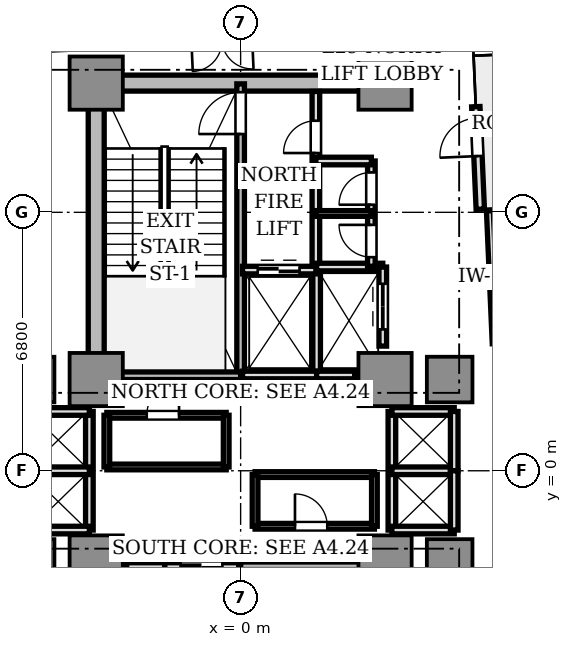
"""IFC4 building model, lengths in metres.
Left out: names, types, materials, properties, quantities, classifications, styles, units other than length and angle.
Written with IfcOpenShell. Run it as: python <this file> out.ifc"""

import sys

from ifc_helpers import new_model, si_unit, direction, frame, frame_2d, origin, origin_2d, place, context, subcontext, project, spatial, rectangle, extrude, source, transform, mapped, element, fill, save


model = new_model("IFC4")
c1 = context("Model", 3, precision=1e-05, world=origin(), true_north=direction((0.0, 1.0)))
c2 = subcontext(c1, "Body", "Model", "MODEL_VIEW")
j1 = project(units=[si_unit("LENGTHUNIT", "METRE"), si_unit("PLANEANGLEUNIT", "RADIAN")], contexts=[c1])
p1 = place(None, origin())
s1 = spatial("IfcSite", under=j1, at=p1, CompositionType="ELEMENT")
p2 = place(p1, origin())
s2 = spatial("IfcBuilding", under=s1, at=p2, CompositionType="ELEMENT")
p3 = place(p2, frame((0.0, 0.0, 106.95)))
s3 = spatial("IfcBuildingStorey", under=s2, at=p3, CompositionType="ELEMENT", Elevation=106.95)
p4 = place(p3, frame((-3.55, 10.2, 0.0), z_axis=(0.0, 0.0, 1.0), x_axis=(1.0, 0.0, 0.0)))
e1 = element("IfcWall", 1, at=p4, inside=s3, PredefinedType="SHEAR", context=c2, shape_type="SweptSolid", body=[
    extrude(rectangle(XDim=7.1, YDim=0.42, at=frame_2d((3.55, 0.0))), origin(), (0.0, 0.0, 1.0), 4.26),
])
p5 = place(p3, frame((-3.8, 2.85, 0.0), z_axis=(0.0, 0.0, 1.0), x_axis=(0.0, 1.0, 0.0)))
e2 = element("IfcWall", 2, at=p5, inside=s3, PredefinedType="SHEAR", context=c2, shape_type="SweptSolid", body=[
    extrude(rectangle(XDim=6.9, YDim=0.42, at=frame_2d((3.45, 0.0))), origin(), (0.0, 0.0, 1.0), 4.26),
])
m1 = source(origin(), c2, "Body", "SweptSolid", [
    extrude(rectangle(XDim=1.4, YDim=1.4, at=origin_2d()), origin(), (0.0, 0.0, 1.0), 4.26),
])
for number, where, z_axis, x_axis in (
    (3, (-3.8, 2.4, 0.0), (0.0, 0.0, 1.0), (1.0, 0.0, 0.0)),
    (4, (3.8, 2.4, 0.0), (0.0, 0.0, 1.0), (1.0, 0.0, 0.0)),
    (5, (-3.8, 10.2, 0.0), (0.0, 0.0, 1.0), (1.0, 0.0, 0.0)),
    (6, (3.8, 10.2, 0.0), (0.0, 0.0, 1.0), (1.0, 0.0, 0.0)),
    (7, (-3.8, -2.4, 0.0), (0.0, 0.0, 1.0), (1.0, 0.0, 0.0)),
    (8, (3.8, -2.4, 0.0), (0.0, 0.0, 1.0), (1.0, 0.0, 0.0)),
):
    element("IfcColumn", number, at=place(p3, frame(where, z_axis=z_axis, x_axis=x_axis)), inside=s3, PredefinedType="COLUMN", context=c2, shape_type="MappedRepresentation", body=[
        mapped(m1, transform((0.0, 0.0, 0.0), scale=1.0)),
    ])
m2 = source(origin(), c2, "Body", "SweptSolid", [
    extrude(rectangle(XDim=1.2, YDim=1.2, at=origin_2d()), origin(), (0.0, 0.0, 1.0), 4.26),
])
for number, where, z_axis, x_axis in (
    (9, (5.5, 2.4, 0.0), (0.0, 0.0, 1.0), (1.0, 0.0, 0.0)),
    (10, (-5.5, 2.4, 0.0), (0.0, 0.0, 1.0), (1.0, 0.0, 0.0)),
    (11, (5.5, -2.4, 0.0), (0.0, 0.0, 1.0), (1.0, 0.0, 0.0)),
    (12, (-5.5, -2.4, 0.0), (0.0, 0.0, 1.0), (1.0, 0.0, 0.0)),
):
    element("IfcColumn", number, at=place(p3, frame(where, z_axis=z_axis, x_axis=x_axis)), inside=s3, PredefinedType="COLUMN", context=c2, shape_type="MappedRepresentation", body=[
        mapped(m2, transform((0.0, 0.0, 0.0), scale=1.0)),
    ])
p6 = place(p3, frame((6.306, 6.882, 0.0), z_axis=(0.0, 0.0, 1.0), x_axis=(-0.043672655174, 0.999045894436, 0.0)))
e13 = element("IfcWall", 13, at=p6, inside=s3, PredefinedType="STANDARD", context=c2, shape_type="SweptSolid", body=[
    extrude(rectangle(XDim=2.7, YDim=0.22, at=frame_2d((1.35, 0.0))), origin(), (0.0, 0.0, 1.0), 4.26),
])
p7 = place(p6, frame((1.4, 0.0, 0.0)))
e14 = element("IfcOpeningElement", 14, at=p7, cuts=e13, PredefinedType="OPENING", context=c2, shape_type="SweptSolid", body=[
    extrude(rectangle(XDim=1.0, YDim=2.2, at=frame_2d((0.5, 1.1))), frame((0.0, 0.12, 0.0), z_axis=(0.0, -1.0, 0.0), x_axis=(1.0, 0.0, 0.0)), (0.0, 0.0, 1.0), 0.24),
])
p8 = place(p3, frame((0.0, 2.5, 0.0), z_axis=(0.0, 0.0, 1.0), x_axis=(0.0, 1.0, 0.0)))
e15 = element("IfcWall", 15, at=p8, inside=s3, PredefinedType="SOLIDWALL", context=c2, shape_type="SweptSolid", body=[
    extrude(rectangle(XDim=7.68, YDim=0.2, at=frame_2d((3.84, 0.0))), origin(), (0.0, 0.0, 1.0), 4.26),
])
p9 = place(p8, frame((6.36, 0.0, 0.0)))
e16 = element("IfcOpeningElement", 16, at=p9, cuts=e15, PredefinedType="OPENING", context=c2, shape_type="SweptSolid", body=[
    extrude(rectangle(XDim=1.1, YDim=2.15, at=frame_2d((0.55, 1.075))), frame((0.0, 0.11, 0.0), z_axis=(0.0, -1.0, 0.0), x_axis=(1.0, 0.0, 0.0)), (0.0, 0.0, 1.0), 0.22),
])
p10 = place(p3, frame((-3.72, 2.5, 0.0), z_axis=(0.0, 0.0, 1.0), x_axis=(1.0, 0.0, 0.0)))
e17 = element("IfcWall", 17, at=p10, inside=s3, PredefinedType="SOLIDWALL", context=c2, shape_type="SweptSolid", body=[
    extrude(rectangle(XDim=3.72, YDim=0.2, at=frame_2d((1.86, 0.0))), origin(), (0.0, 0.0, 1.0), 4.26),
])
p11 = place(p3, frame((0.0, -10.18, 0.0), z_axis=(0.0, 0.0, 1.0), x_axis=(0.0, 1.0, 0.0)))
e18 = element("IfcWall", 18, at=p11, inside=s3, PredefinedType="SOLIDWALL", context=c2, shape_type="SweptSolid", body=[
    extrude(rectangle(XDim=7.68, YDim=0.2, at=frame_2d((3.84, 0.0))), origin(), (0.0, 0.0, 1.0), 4.26),
])
p12 = place(p11, frame((0.28, 0.0, 0.0)))
e19 = element("IfcOpeningElement", 19, at=p12, cuts=e18, PredefinedType="OPENING", context=c2, shape_type="SweptSolid", body=[
    extrude(rectangle(XDim=1.1, YDim=2.15, at=frame_2d((0.55, 1.075))), frame((0.0, 0.11, 0.0), z_axis=(0.0, -1.0, 0.0), x_axis=(1.0, 0.0, 0.0)), (0.0, 0.0, 1.0), 0.22),
])
p13 = place(p3, frame((0.0, -2.5, 0.0), z_axis=(0.0, 0.0, 1.0), x_axis=(1.0, 0.0, 0.0)))
e20 = element("IfcWall", 20, at=p13, inside=s3, PredefinedType="SOLIDWALL", context=c2, shape_type="SweptSolid", body=[
    extrude(rectangle(XDim=3.72, YDim=0.2, at=frame_2d((1.86, 0.0))), origin(), (0.0, 0.0, 1.0), 4.26),
])
p14 = place(p3, frame((1.98, 5.32, 0.0), z_axis=(0.0, 0.0, 1.0), x_axis=(0.0, 1.0, 0.0)))
e21 = element("IfcWall", 21, at=p14, inside=s3, PredefinedType="SOLIDWALL", context=c2, shape_type="SweptSolid", body=[
    extrude(rectangle(XDim=4.66, YDim=0.2, at=frame_2d((2.33, 0.0))), origin(), (0.0, 0.0, 1.0), 3.81),
])
p15 = place(p14, frame((3.04, 0.0, 0.0)))
e22 = element("IfcOpeningElement", 22, at=p15, cuts=e21, PredefinedType="OPENING", context=c2, shape_type="SweptSolid", body=[
    extrude(rectangle(XDim=0.85, YDim=2.1, at=frame_2d((0.425, 1.05))), frame((0.0, 0.11, 0.0), z_axis=(0.0, -1.0, 0.0), x_axis=(1.0, 0.0, 0.0)), (0.0, 0.0, 1.0), 0.22),
])
p16 = place(p3, frame((2.0, 2.5, 0.0), z_axis=(0.0, 0.0, 1.0), x_axis=(0.0, 1.0, 0.0)))
e23 = element("IfcWall", 23, at=p16, inside=s3, PredefinedType="SOLIDWALL", context=c2, shape_type="SweptSolid", body=[
    extrude(rectangle(XDim=2.78, YDim=0.2, at=frame_2d((1.39, 0.0))), origin(), (0.0, 0.0, 1.0), 3.81),
])
p17 = place(p3, frame((0.05, 2.52, 0.0), z_axis=(0.0, 0.0, 1.0), x_axis=(1.0, 0.0, 0.0)))
e24 = element("IfcWall", 24, at=p17, inside=s3, PredefinedType="SOLIDWALL", context=c2, shape_type="SweptSolid", body=[
    extrude(rectangle(XDim=1.95, YDim=0.2, at=frame_2d((0.975, 0.0))), origin(), (0.0, 0.0, 1.0), 3.81),
])
p18 = place(p3, frame((0.05, 5.28, 0.0), z_axis=(0.0, 0.0, 1.0), x_axis=(1.0, 0.0, 0.0)))
e25 = element("IfcWall", 25, at=p18, inside=s3, PredefinedType="SOLIDWALL", context=c2, shape_type="SweptSolid", body=[
    extrude(rectangle(XDim=1.93, YDim=0.2, at=frame_2d((0.965, 0.0))), origin(), (0.0, 0.0, 1.0), 3.81),
])
p19 = place(p18, frame((0.4, 0.0, 0.0)))
e26 = element("IfcOpeningElement", 26, at=p19, cuts=e25, PredefinedType="OPENING", context=c2, shape_type="SweptSolid", body=[
    extrude(rectangle(XDim=1.1, YDim=2.2, at=frame_2d((0.55, 1.1))), frame((0.0, 0.11, 0.0), z_axis=(0.0, -1.0, 0.0), x_axis=(1.0, 0.0, 0.0)), (0.0, 0.0, 1.0), 0.22),
])
p20 = place(p3, frame((-2.0, -5.28, 0.0), z_axis=(0.0, 0.0, 1.0), x_axis=(0.0, 1.0, 0.0)))
e27 = element("IfcWall", 27, at=p20, inside=s3, PredefinedType="SOLIDWALL", context=c2, shape_type="SweptSolid", body=[
    extrude(rectangle(XDim=2.78, YDim=0.2, at=frame_2d((1.39, 0.0))), origin(), (0.0, 0.0, 1.0), 3.81),
])
p21 = place(p3, frame((-2.0, -2.52, 0.0), z_axis=(0.0, 0.0, 1.0), x_axis=(1.0, 0.0, 0.0)))
e28 = element("IfcWall", 28, at=p21, inside=s3, PredefinedType="SOLIDWALL", context=c2, shape_type="SweptSolid", body=[
    extrude(rectangle(XDim=1.95, YDim=0.2, at=frame_2d((0.975, 0.0))), origin(), (0.0, 0.0, 1.0), 3.81),
])
p22 = place(p21, frame((0.42, 0.0, 0.0)))
e29 = element("IfcOpeningElement", 29, at=p22, cuts=e28, PredefinedType="OPENING", context=c2, shape_type="SweptSolid", body=[
    extrude(rectangle(XDim=1.1, YDim=2.2, at=frame_2d((0.55, 1.1))), frame((0.0, 0.11, 0.0), z_axis=(0.0, -1.0, 0.0), x_axis=(1.0, 0.0, 0.0)), (0.0, 0.0, 1.0), 0.22),
])
p23 = place(p3, frame((2.0, 2.52, 0.0), z_axis=(0.0, 0.0, 1.0), x_axis=(1.0, 0.0, 0.0)))
e30 = element("IfcWall", 30, at=p23, inside=s3, PredefinedType="SOLIDWALL", context=c2, shape_type="SweptSolid", body=[
    extrude(rectangle(XDim=1.0, YDim=0.2, at=frame_2d((0.5, 0.0))), origin(), (0.0, 0.0, 1.0), 3.81),
])
p24 = place(p3, frame((2.0, 5.36, 0.0), z_axis=(0.0, 0.0, 1.0), x_axis=(1.0, 0.0, 0.0)))
e31 = element("IfcWall", 31, at=p24, inside=s3, PredefinedType="SOLIDWALL", context=c2, shape_type="SweptSolid", body=[
    extrude(rectangle(XDim=1.74, YDim=0.2, at=frame_2d((0.87, 0.0))), origin(), (0.0, 0.0, 1.0), 3.81),
])
p25 = place(p3, frame((3.74, 3.28, 0.0), z_axis=(0.0, 0.0, 1.0), x_axis=(0.0, 1.0, 0.0)))
e32 = element("IfcWall", 32, at=p25, inside=s3, PredefinedType="SOLIDWALL", context=c2, shape_type="SweptSolid", body=[
    extrude(rectangle(XDim=2.08, YDim=0.2, at=frame_2d((1.04, 0.0))), origin(), (0.0, 0.0, 1.0), 3.81),
])
p26 = place(p25, frame((0.44, 0.0, 0.0)))
e33 = element("IfcOpeningElement", 33, at=p26, cuts=e32, PredefinedType="OPENING", context=c2, shape_type="SweptSolid", body=[
    extrude(rectangle(XDim=1.2, YDim=2.2, at=frame_2d((0.6, 1.1))), frame((0.0, 0.11, 0.0), z_axis=(0.0, -1.0, 0.0), x_axis=(1.0, 0.0, 0.0)), (0.0, 0.0, 1.0), 0.22),
])
p27 = place(p3, frame((-3.0, -2.52, 0.0), z_axis=(0.0, 0.0, 1.0), x_axis=(1.0, 0.0, 0.0)))
e34 = element("IfcWall", 34, at=p27, inside=s3, PredefinedType="SOLIDWALL", context=c2, shape_type="SweptSolid", body=[
    extrude(rectangle(XDim=1.0, YDim=0.2, at=frame_2d((0.5, 0.0))), origin(), (0.0, 0.0, 1.0), 3.81),
])
p28 = place(p3, frame((3.98, -1.56, 0.0), z_axis=(0.0, 0.0, 1.0), x_axis=(0.0, 1.0, 0.0)))
e35 = element("IfcWall", 35, at=p28, inside=s3, PredefinedType="SOLIDWALL", context=c2, shape_type="SweptSolid", body=[
    extrude(rectangle(XDim=3.12, YDim=0.2, at=frame_2d((1.56, 0.0))), origin(), (0.0, 0.0, 1.0), 3.43),
])
for number, where, z_axis, x_axis in (
    (36, (3.98, 1.56, 0.0), (0.0, 0.0, 1.0), (1.0, 0.0, 0.0)),
    (37, (3.98, -1.56, 0.0), (0.0, 0.0, 1.0), (1.0, 0.0, 0.0)),
    (38, (3.98, 0.0, 0.0), (0.0, 0.0, 1.0), (1.0, 0.0, 0.0)),
):
    element("IfcWall", number, at=place(p3, frame(where, z_axis=z_axis, x_axis=x_axis)), inside=s3, PredefinedType="SOLIDWALL", context=c2, shape_type="SweptSolid", body=[
        extrude(rectangle(XDim=1.64, YDim=0.2, at=frame_2d((0.82, 0.0))), origin(), (0.0, 0.0, 1.0), 3.81),
    ])
for number, where, z_axis, x_axis in (
    (39, (5.62, 0.0, 0.0), (0.0, 0.0, 1.0), (0.0, 1.0, 0.0)),
    (40, (5.62, -1.56, 0.0), (0.0, 0.0, 1.0), (0.0, 1.0, 0.0)),
):
    element("IfcWall", number, at=place(p3, frame(where, z_axis=z_axis, x_axis=x_axis)), inside=s3, PredefinedType="SOLIDWALL", context=c2, shape_type="SweptSolid", body=[
        extrude(rectangle(XDim=1.56, YDim=0.2, at=frame_2d((0.78, 0.0))), origin(), (0.0, 0.0, 1.0), 3.81),
    ])
p29 = place(p3, frame((-3.98, -1.56, 0.0), z_axis=(0.0, 0.0, 1.0), x_axis=(0.0, 1.0, 0.0)))
e41 = element("IfcWall", 41, at=p29, inside=s3, PredefinedType="SOLIDWALL", context=c2, shape_type="SweptSolid", body=[
    extrude(rectangle(XDim=3.12, YDim=0.2, at=frame_2d((1.56, 0.0))), origin(), (0.0, 0.0, 1.0), 3.43),
])
for number, where, z_axis, x_axis in (
    (42, (-5.62, 1.56, 0.0), (0.0, 0.0, 1.0), (1.0, 0.0, 0.0)),
    (43, (-5.62, -1.56, 0.0), (0.0, 0.0, 1.0), (1.0, 0.0, 0.0)),
    (44, (-5.62, 0.0, 0.0), (0.0, 0.0, 1.0), (1.0, 0.0, 0.0)),
):
    element("IfcWall", number, at=place(p3, frame(where, z_axis=z_axis, x_axis=x_axis)), inside=s3, PredefinedType="SOLIDWALL", context=c2, shape_type="SweptSolid", body=[
        extrude(rectangle(XDim=1.64, YDim=0.2, at=frame_2d((0.82, 0.0))), origin(), (0.0, 0.0, 1.0), 3.81),
    ])
p30 = place(p3, frame((3.44, 5.38, 0.0), z_axis=(0.0, 0.0, 1.0), x_axis=(0.0, 1.0, 0.0)))
e45 = element("IfcWall", 45, at=p30, inside=s3, PredefinedType="SOLIDWALL", context=c2, shape_type="SweptSolid", body=[
    extrude(rectangle(XDim=2.77, YDim=0.2, at=frame_2d((1.385, 0.0))), origin(), (0.0, 0.0, 1.0), 3.81),
])
p31 = place(p30, frame((0.24, 0.0, 0.0)))
e46 = element("IfcOpeningElement", 46, at=p31, cuts=e45, PredefinedType="OPENING", context=c2, shape_type="SweptSolid", body=[
    extrude(rectangle(XDim=0.85, YDim=2.1, at=frame_2d((0.425, 1.05))), frame((0.0, 0.11, 0.0), z_axis=(0.0, -1.0, 0.0), x_axis=(1.0, 0.0, 0.0)), (0.0, 0.0, 1.0), 0.22),
])
p32 = place(p30, frame((1.62, 0.0, 0.0)))
e47 = element("IfcOpeningElement", 47, at=p32, cuts=e45, PredefinedType="OPENING", context=c2, shape_type="SweptSolid", body=[
    extrude(rectangle(XDim=0.85, YDim=2.1, at=frame_2d((0.425, 1.05))), frame((0.0, 0.11, 0.0), z_axis=(0.0, -1.0, 0.0), x_axis=(1.0, 0.0, 0.0)), (0.0, 0.0, 1.0), 0.22),
])
p33 = place(p3, frame((1.98, 8.15, 0.0), z_axis=(0.0, 0.0, 1.0), x_axis=(1.0, 0.0, 0.0)))
e48 = element("IfcWall", 48, at=p33, inside=s3, PredefinedType="SOLIDWALL", context=c2, shape_type="SweptSolid", body=[
    extrude(rectangle(XDim=1.46, YDim=0.2, at=frame_2d((0.73, 0.0))), origin(), (0.0, 0.0, 1.0), 3.81),
])
p34 = place(p3, frame((1.98, 6.77, 0.0), z_axis=(0.0, 0.0, 1.0), x_axis=(1.0, 0.0, 0.0)))
e49 = element("IfcWall", 49, at=p34, inside=s3, PredefinedType="PARTITIONING", context=c2, shape_type="SweptSolid", body=[
    extrude(rectangle(XDim=1.46, YDim=0.15, at=frame_2d((0.73, 0.0))), origin(), (0.0, 0.0, 1.0), 3.81),
])
p35 = place(p3, frame((-3.52, 0.1, 0.0), z_axis=(0.0, 0.0, 1.0), x_axis=(1.0, 0.0, 0.0)))
e50 = element("IfcWall", 50, at=p35, inside=s3, PredefinedType="PARTITIONING", context=c2, shape_type="SweptSolid", body=[
    extrude(rectangle(XDim=3.14, YDim=0.15, at=frame_2d((1.57, 0.0))), origin(), (0.0, 0.0, 1.0), 3.81),
])
p36 = place(p3, frame((-3.52, 1.46, 0.0), z_axis=(0.0, 0.0, 1.0), x_axis=(1.0, 0.0, 0.0)))
e51 = element("IfcWall", 51, at=p36, inside=s3, PredefinedType="PARTITIONING", context=c2, shape_type="SweptSolid", body=[
    extrude(rectangle(XDim=3.14, YDim=0.15, at=frame_2d((1.57, 0.0))), origin(), (0.0, 0.0, 1.0), 3.81),
])
p37 = place(p36, frame((1.05, 0.0, 0.0)))
e52 = element("IfcOpeningElement", 52, at=p37, cuts=e51, PredefinedType="OPENING", context=c2, shape_type="SweptSolid", body=[
    extrude(rectangle(XDim=0.85, YDim=2.1, at=frame_2d((0.425, 1.05))), frame((0.0, 0.085, 0.0), z_axis=(0.0, -1.0, 0.0), x_axis=(1.0, 0.0, 0.0)), (0.0, 0.0, 1.0), 0.17),
])
p38 = place(p3, frame((-3.52, 0.1, 0.0), z_axis=(0.0, 0.0, 1.0), x_axis=(0.0, 1.0, 0.0)))
e53 = element("IfcWall", 53, at=p38, inside=s3, PredefinedType="PARTITIONING", context=c2, shape_type="SweptSolid", body=[
    extrude(rectangle(XDim=1.36, YDim=0.15, at=frame_2d((0.68, 0.0))), origin(), (0.0, 0.0, 1.0), 3.43),
])
p39 = place(p3, frame((-0.38, 0.1, 0.0), z_axis=(0.0, 0.0, 1.0), x_axis=(0.0, 1.0, 0.0)))
e54 = element("IfcWall", 54, at=p39, inside=s3, PredefinedType="PARTITIONING", context=c2, shape_type="SweptSolid", body=[
    extrude(rectangle(XDim=1.36, YDim=0.15, at=frame_2d((0.68, 0.0))), origin(), (0.0, 0.0, 1.0), 3.81),
])
p40 = place(p3, frame((0.38, -0.1, 0.0), z_axis=(0.0, 0.0, 1.0), x_axis=(1.0, 0.0, 0.0)))
e55 = element("IfcWall", 55, at=p40, inside=s3, PredefinedType="PARTITIONING", context=c2, shape_type="SweptSolid", body=[
    extrude(rectangle(XDim=3.14, YDim=0.15, at=frame_2d((1.57, 0.0))), origin(), (0.0, 0.0, 1.0), 3.81),
])
p41 = place(p3, frame((0.38, -1.46, 0.0), z_axis=(0.0, 0.0, 1.0), x_axis=(1.0, 0.0, 0.0)))
e56 = element("IfcWall", 56, at=p41, inside=s3, PredefinedType="PARTITIONING", context=c2, shape_type="SweptSolid", body=[
    extrude(rectangle(XDim=3.14, YDim=0.15, at=frame_2d((1.57, 0.0))), origin(), (0.0, 0.0, 1.0), 3.81),
])
p42 = place(p41, frame((1.05, 0.0, 0.0)))
e57 = element("IfcOpeningElement", 57, at=p42, cuts=e56, PredefinedType="OPENING", context=c2, shape_type="SweptSolid", body=[
    extrude(rectangle(XDim=0.85, YDim=2.1, at=frame_2d((0.425, 1.05))), frame((0.0, 0.085, 0.0), z_axis=(0.0, -1.0, 0.0), x_axis=(1.0, 0.0, 0.0)), (0.0, 0.0, 1.0), 0.17),
])
p43 = place(p3, frame((0.38, -1.46, 0.0), z_axis=(0.0, 0.0, 1.0), x_axis=(0.0, 1.0, 0.0)))
e58 = element("IfcWall", 58, at=p43, inside=s3, PredefinedType="PARTITIONING", context=c2, shape_type="SweptSolid", body=[
    extrude(rectangle(XDim=1.36, YDim=0.15, at=frame_2d((0.68, 0.0))), origin(), (0.0, 0.0, 1.0), 3.81),
])
p44 = place(p3, frame((3.52, -1.46, 0.0), z_axis=(0.0, 0.0, 1.0), x_axis=(0.0, 1.0, 0.0)))
e59 = element("IfcWall", 59, at=p44, inside=s3, PredefinedType="PARTITIONING", context=c2, shape_type="SweptSolid", body=[
    extrude(rectangle(XDim=1.36, YDim=0.15, at=frame_2d((0.68, 0.0))), origin(), (0.0, 0.0, 1.0), 3.43),
])
p45 = place(p3, frame((6.71, 3.346, 0.0), z_axis=(0.0, 0.0, 1.0), x_axis=(-0.043597663116, 0.999049169846, 0.0)))
e60 = element("IfcWall", 60, at=p45, inside=s3, PredefinedType="PARTITIONING", context=c2, shape_type="SweptSolid", body=[
    extrude(rectangle(XDim=3.5, YDim=0.18, at=frame_2d((1.75, 0.0))), origin(), (0.0, 0.0, 1.0), 3.81),
])
p46 = place(p3, frame((6.049, 11.625, 0.0), z_axis=(0.0, 0.0, 1.0), x_axis=(-0.999047806124, -0.043628901879, 0.0)))
e61 = element("IfcWall", 61, at=p46, inside=s3, PredefinedType="PARTITIONING", context=c2, shape_type="SweptSolid", body=[
    extrude(rectangle(XDim=13.1, YDim=0.15, at=frame_2d((6.55, 0.0))), origin(), (0.0, 0.0, 1.0), 3.81),
])
p47 = place(p46, frame((5.75, 0.0, 0.0)))
e62 = element("IfcOpeningElement", 62, at=p47, cuts=e61, PredefinedType="OPENING", context=c2, shape_type="SweptSolid", body=[
    extrude(rectangle(XDim=1.6, YDim=2.25, at=frame_2d((0.8, 1.125))), frame((0.0, 0.085, 0.0), z_axis=(0.0, -1.0, 0.0), x_axis=(1.0, 0.0, 0.0)), (0.0, 0.0, 1.0), 0.17),
])
m3 = source(origin(), c2, "Body", "SweptSolid", [
    extrude(rectangle(XDim=1.0, YDim=0.05, at=origin_2d()), origin(), (0.0, 0.0, 1.0), 2.2),
])
p48 = place(p7, frame((0.5, 0.0, 0.0)))
e63 = element("IfcDoor", 63, at=p48, inside=s3, OperationType="SINGLE_SWING_LEFT", PredefinedType="DOOR", context=c2, shape_type="MappedRepresentation", body=[
    mapped(m3, transform((0.0, 0.0, 0.0), scale=1.0)),
])
fill(e14, e63)
m4 = source(origin(), c2, "Body", "SweptSolid", [
    extrude(rectangle(XDim=1.1, YDim=0.05, at=origin_2d()), origin(), (0.0, 0.0, 1.0), 2.15),
])
p49 = place(p9, frame((0.55, 0.0, 0.0)))
e64 = element("IfcDoor", 64, at=p49, inside=s3, OperationType="SINGLE_SWING_LEFT", PredefinedType="DOOR", context=c2, shape_type="MappedRepresentation", body=[
    mapped(m4, transform((0.0, 0.0, 0.0), scale=1.0)),
])
fill(e16, e64)
m5 = source(origin(), c2, "Body", "SweptSolid", [
    extrude(rectangle(XDim=0.85, YDim=0.05, at=origin_2d()), origin(), (0.0, 0.0, 1.0), 2.1),
])
p50 = place(p15, frame((0.425, 0.0, 0.0)))
e65 = element("IfcDoor", 65, at=p50, inside=s3, OperationType="SINGLE_SWING_LEFT", PredefinedType="DOOR", context=c2, shape_type="MappedRepresentation", body=[
    mapped(m5, transform((0.0, 0.0, 0.0), scale=1.0)),
])
fill(e22, e65)
m6 = source(origin(), c2, "Body", "SweptSolid", [
    extrude(rectangle(XDim=1.1, YDim=0.05, at=origin_2d()), origin(), (0.0, 0.0, 1.0), 2.2),
])
p51 = place(p19, frame((0.55, 0.0, 0.0)))
e66 = element("IfcDoor", 66, at=p51, inside=s3, OperationType="DOUBLE_DOOR_SLIDING", PredefinedType="DOOR", context=c2, shape_type="MappedRepresentation", body=[
    mapped(m6, transform((0.0, 0.0, 0.0), scale=1.0)),
])
fill(e26, e66)
p52 = place(p22, frame((0.55, 0.0, 0.0)))
e67 = element("IfcDoor", 67, at=p52, inside=s3, OperationType="DOUBLE_DOOR_SLIDING", PredefinedType="DOOR", context=c2, shape_type="MappedRepresentation", body=[
    mapped(m6, transform((0.0, 0.0, 0.0), scale=1.0)),
])
fill(e29, e67)
m7 = source(origin(), c2, "Body", "SweptSolid", [
    extrude(rectangle(XDim=1.2, YDim=0.05, at=origin_2d()), origin(), (0.0, 0.0, 1.0), 2.2),
])
p53 = place(p26, frame((0.6, 0.0, 0.0)))
e68 = element("IfcDoor", 68, at=p53, inside=s3, OperationType="DOUBLE_DOOR_SLIDING", PredefinedType="DOOR", context=c2, shape_type="MappedRepresentation", body=[
    mapped(m7, transform((0.0, 0.0, 0.0), scale=1.0)),
])
fill(e33, e68)
p54 = place(p31, frame((0.425, 0.0, 0.0)))
e69 = element("IfcDoor", 69, at=p54, inside=s3, OperationType="SINGLE_SWING_RIGHT", PredefinedType="DOOR", context=c2, shape_type="MappedRepresentation", body=[
    mapped(m5, transform((0.0, 0.0, 0.0), scale=1.0)),
])
fill(e46, e69)
p55 = place(p32, frame((0.425, 0.0, 0.0)))
e70 = element("IfcDoor", 70, at=p55, inside=s3, OperationType="SINGLE_SWING_LEFT", PredefinedType="DOOR", context=c2, shape_type="MappedRepresentation", body=[
    mapped(m5, transform((0.0, 0.0, 0.0), scale=1.0)),
])
fill(e47, e70)
p56 = place(p37, frame((0.425, 0.0, 0.0)))
e71 = element("IfcDoor", 71, at=p56, inside=s3, OperationType="SINGLE_SWING_RIGHT", PredefinedType="DOOR", context=c2, shape_type="MappedRepresentation", body=[
    mapped(m5, transform((0.0, 0.0, 0.0), scale=1.0)),
])
fill(e52, e71)
p57 = place(p42, frame((0.425, 0.0, 0.0)))
e72 = element("IfcDoor", 72, at=p57, inside=s3, OperationType="SINGLE_SWING_LEFT", PredefinedType="DOOR", context=c2, shape_type="MappedRepresentation", body=[
    mapped(m5, transform((0.0, 0.0, 0.0), scale=1.0)),
])
fill(e57, e72)
save(model, sys.argv[1])
